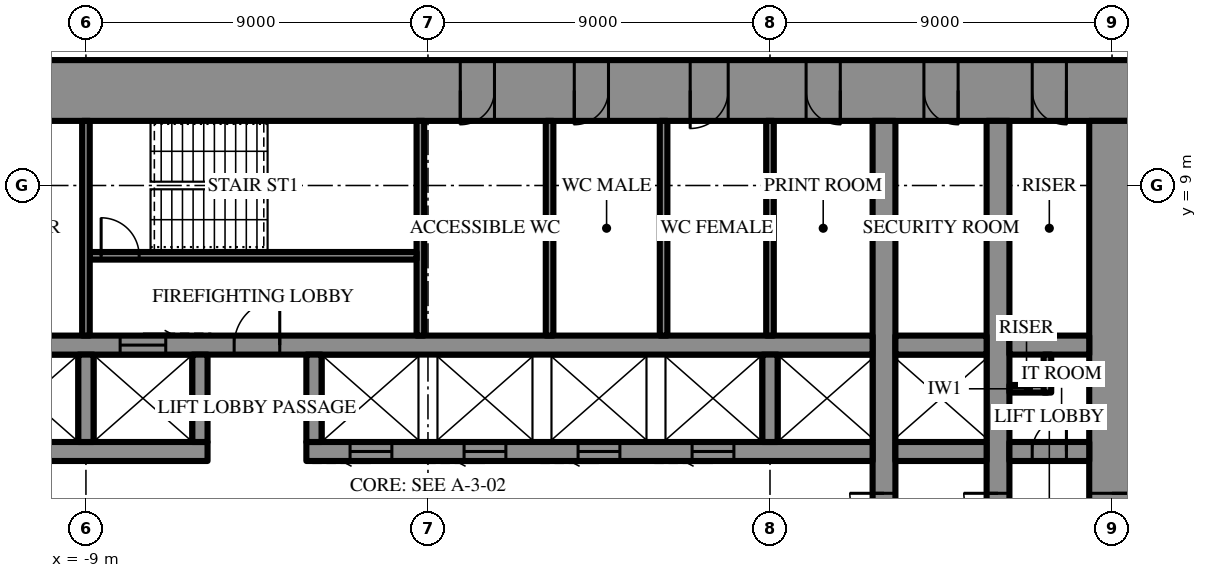
"""IFC4 building model, lengths in metres.
Left out: names, types, materials, properties, quantities, classifications, styles, units other than length and angle.
Written with IfcOpenShell. Run it as: python <this file> out.ifc"""

import sys

from ifc_helpers import new_model, si_unit, direction, frame, frame_2d, origin, place, context, subcontext, project, spatial, rectangle, extrude, element, fill, save


model = new_model("IFC4")
c1 = context("Model", 3, precision=1e-05, world=origin(), true_north=direction((0.0, 1.0)))
c2 = subcontext(c1, "Body", "Model", "MODEL_VIEW")
j1 = project(units=[si_unit("LENGTHUNIT", "METRE"), si_unit("PLANEANGLEUNIT", "RADIAN")], contexts=[c1])
p1 = place(None, origin())
s1 = spatial("IfcSite", under=j1, at=p1, CompositionType="ELEMENT")
p2 = place(p1, origin())
s2 = spatial("IfcBuilding", under=s1, at=p2, CompositionType="ELEMENT")
p3 = place(p2, frame((0.0, 0.0, 132.1)))
s3 = spatial("IfcBuildingStorey", under=s2, at=p3, CompositionType="ELEMENT", Elevation=132.1)
p4 = place(p3, frame((-18.6, 11.5, 0.0), z_axis=(0.0, 0.0, 1.0), x_axis=(1.0, 0.0, 0.0)))
e1 = element("IfcWall", 1, at=p4, inside=s3, PredefinedType="SHEAR", context=c2, shape_type="SweptSolid", body=[
    extrude(rectangle(XDim=37.2, YDim=1.6, at=frame_2d((18.6, 0.0))), origin(), (0.0, 0.0, 1.0), 4.2),
])
p5 = place(p4, frame((19.45, 0.0, 0.0)))
e2 = element("IfcOpeningElement", 2, at=p5, cuts=e1, PredefinedType="OPENING", context=c2, shape_type="SweptSolid", body=[
    extrude(rectangle(XDim=0.9, YDim=2.2, at=frame_2d((0.45, 1.1))), frame((0.0, 0.81, 0.0), z_axis=(0.0, -1.0, 0.0), x_axis=(1.0, 0.0, 0.0)), (0.0, 0.0, 1.0), 1.62),
])
p6 = place(p4, frame((22.45, 0.0, 0.0)))
e3 = element("IfcOpeningElement", 3, at=p6, cuts=e1, PredefinedType="OPENING", context=c2, shape_type="SweptSolid", body=[
    extrude(rectangle(XDim=0.9, YDim=2.2, at=frame_2d((0.45, 1.1))), frame((0.0, 0.81, 0.0), z_axis=(0.0, -1.0, 0.0), x_axis=(1.0, 0.0, 0.0)), (0.0, 0.0, 1.0), 1.62),
])
p7 = place(p4, frame((25.5, 0.0, 0.0)))
e4 = element("IfcOpeningElement", 4, at=p7, cuts=e1, PredefinedType="OPENING", context=c2, shape_type="SweptSolid", body=[
    extrude(rectangle(XDim=1.0, YDim=2.2, at=frame_2d((0.5, 1.1))), frame((0.0, 0.81, 0.0), z_axis=(0.0, -1.0, 0.0), x_axis=(1.0, 0.0, 0.0)), (0.0, 0.0, 1.0), 1.62),
])
p8 = place(p4, frame((1.8, 0.0, 0.0)))
e5 = element("IfcOpeningElement", 5, at=p8, cuts=e1, PredefinedType="OPENING", context=c2, shape_type="SweptSolid", body=[
    extrude(rectangle(XDim=0.9, YDim=2.2, at=frame_2d((0.45, 1.1))), frame((0.0, 0.81, 0.0), z_axis=(0.0, -1.0, 0.0), x_axis=(1.0, 0.0, 0.0)), (0.0, 0.0, 1.0), 1.62),
])
p9 = place(p4, frame((4.65, 0.0, 0.0)))
e6 = element("IfcOpeningElement", 6, at=p9, cuts=e1, PredefinedType="OPENING", context=c2, shape_type="SweptSolid", body=[
    extrude(rectangle(XDim=0.9, YDim=2.2, at=frame_2d((0.45, 1.1))), frame((0.0, 0.81, 0.0), z_axis=(0.0, -1.0, 0.0), x_axis=(1.0, 0.0, 0.0)), (0.0, 0.0, 1.0), 1.62),
])
p10 = place(p4, frame((7.75, 0.0, 0.0)))
e7 = element("IfcOpeningElement", 7, at=p10, cuts=e1, PredefinedType="OPENING", context=c2, shape_type="SweptSolid", body=[
    extrude(rectangle(XDim=0.9, YDim=2.2, at=frame_2d((0.45, 1.1))), frame((0.0, 0.81, 0.0), z_axis=(0.0, -1.0, 0.0), x_axis=(1.0, 0.0, 0.0)), (0.0, 0.0, 1.0), 1.62),
])
p11 = place(p4, frame((28.55, 0.0, 0.0)))
e8 = element("IfcOpeningElement", 8, at=p11, cuts=e1, PredefinedType="OPENING", context=c2, shape_type="SweptSolid", body=[
    extrude(rectangle(XDim=0.9, YDim=2.2, at=frame_2d((0.45, 1.1))), frame((0.0, 0.81, 0.0), z_axis=(0.0, -1.0, 0.0), x_axis=(1.0, 0.0, 0.0)), (0.0, 0.0, 1.0), 1.62),
])
p12 = place(p4, frame((31.65, 0.0, 0.0)))
e9 = element("IfcOpeningElement", 9, at=p12, cuts=e1, PredefinedType="OPENING", context=c2, shape_type="SweptSolid", body=[
    extrude(rectangle(XDim=0.9, YDim=2.2, at=frame_2d((0.45, 1.1))), frame((0.0, 0.81, 0.0), z_axis=(0.0, -1.0, 0.0), x_axis=(1.0, 0.0, 0.0)), (0.0, 0.0, 1.0), 1.62),
])
p13 = place(p4, frame((34.5, 0.0, 0.0)))
e10 = element("IfcOpeningElement", 10, at=p13, cuts=e1, PredefinedType="OPENING", context=c2, shape_type="SweptSolid", body=[
    extrude(rectangle(XDim=0.9, YDim=2.2, at=frame_2d((0.45, 1.1))), frame((0.0, 0.81, 0.0), z_axis=(0.0, -1.0, 0.0), x_axis=(1.0, 0.0, 0.0)), (0.0, 0.0, 1.0), 1.62),
])
p14 = place(p3, frame((18.0, -10.7, 0.0), z_axis=(0.0, 0.0, 1.0), x_axis=(0.0, 1.0, 0.0)))
e11 = element("IfcWall", 11, at=p14, inside=s3, PredefinedType="SHEAR", context=c2, shape_type="SweptSolid", body=[
    extrude(rectangle(XDim=21.4, YDim=1.2, at=frame_2d((10.7, 0.0))), origin(), (0.0, 0.0, 1.0), 4.2),
])
p15 = place(p14, frame((9.8, 0.0, 0.0)))
e12 = element("IfcOpeningElement", 12, at=p15, cuts=e11, PredefinedType="OPENING", context=c2, shape_type="SweptSolid", body=[
    extrude(rectangle(XDim=1.8, YDim=2.4, at=frame_2d((0.9, 1.2))), frame((0.0, 0.61, 0.0), z_axis=(0.0, -1.0, 0.0), x_axis=(1.0, 0.0, 0.0)), (0.0, 0.0, 1.0), 1.22),
])
p16 = place(p3, frame((12.0, -10.7, 0.0), z_axis=(0.0, 0.0, 1.0), x_axis=(0.0, 1.0, 0.0)))
e13 = element("IfcWall", 13, at=p16, inside=s3, PredefinedType="SHEAR", context=c2, shape_type="SweptSolid", body=[
    extrude(rectangle(XDim=21.4, YDim=0.6, at=frame_2d((10.7, 0.0))), origin(), (0.0, 0.0, 1.0), 4.2),
])
p17 = place(p16, frame((9.8, 0.0, 0.0)))
e14 = element("IfcOpeningElement", 14, at=p17, cuts=e13, PredefinedType="OPENING", context=c2, shape_type="SweptSolid", body=[
    extrude(rectangle(XDim=1.8, YDim=2.4, at=frame_2d((0.9, 1.2))), frame((0.0, 0.31, 0.0), z_axis=(0.0, -1.0, 0.0), x_axis=(1.0, 0.0, 0.0)), (0.0, 0.0, 1.0), 0.62),
])
p18 = place(p3, frame((15.0, -10.7, 0.0), z_axis=(0.0, 0.0, 1.0), x_axis=(0.0, 1.0, 0.0)))
e15 = element("IfcWall", 15, at=p18, inside=s3, PredefinedType="SHEAR", context=c2, shape_type="SweptSolid", body=[
    extrude(rectangle(XDim=21.4, YDim=0.6, at=frame_2d((10.7, 0.0))), origin(), (0.0, 0.0, 1.0), 4.2),
])
p19 = place(p18, frame((9.8, 0.0, 0.0)))
e16 = element("IfcOpeningElement", 16, at=p19, cuts=e15, PredefinedType="OPENING", context=c2, shape_type="SweptSolid", body=[
    extrude(rectangle(XDim=1.8, YDim=2.4, at=frame_2d((0.9, 1.2))), frame((0.0, 0.31, 0.0), z_axis=(0.0, -1.0, 0.0), x_axis=(1.0, 0.0, 0.0)), (0.0, 0.0, 1.0), 0.62),
])
p20 = place(p3, frame((-11.7, 2.0, 0.0), z_axis=(0.0, 0.0, 1.0), x_axis=(1.0, 0.0, 0.0)))
e17 = element("IfcWall", 17, at=p20, inside=s3, PredefinedType="SHEAR", context=c2, shape_type="SweptSolid", body=[
    extrude(rectangle(XDim=5.9, YDim=0.5, at=frame_2d((2.95, 0.0))), origin(), (0.0, 0.0, 1.0), 4.2),
])
p21 = place(p3, frame((-3.2, 2.0, 0.0), z_axis=(0.0, 0.0, 1.0), x_axis=(1.0, 0.0, 0.0)))
e18 = element("IfcWall", 18, at=p21, inside=s3, PredefinedType="SHEAR", context=c2, shape_type="SweptSolid", body=[
    extrude(rectangle(XDim=14.9, YDim=0.5, at=frame_2d((7.45, 0.0))), origin(), (0.0, 0.0, 1.0), 4.2),
])
p22 = place(p21, frame((1.15, 0.0, 0.0)))
e19 = element("IfcOpeningElement", 19, at=p22, cuts=e18, PredefinedType="OPENING", context=c2, shape_type="SweptSolid", body=[
    extrude(rectangle(XDim=1.1, YDim=2.2, at=frame_2d((0.55, 1.1))), frame((0.0, 0.26, 0.0), z_axis=(0.0, -1.0, 0.0), x_axis=(1.0, 0.0, 0.0)), (0.0, 0.0, 1.0), 0.52),
])
p23 = place(p21, frame((4.15, 0.0, 0.0)))
e20 = element("IfcOpeningElement", 20, at=p23, cuts=e18, PredefinedType="OPENING", context=c2, shape_type="SweptSolid", body=[
    extrude(rectangle(XDim=1.1, YDim=2.2, at=frame_2d((0.55, 1.1))), frame((0.0, 0.26, 0.0), z_axis=(0.0, -1.0, 0.0), x_axis=(1.0, 0.0, 0.0)), (0.0, 0.0, 1.0), 0.52),
])
p24 = place(p21, frame((7.15, 0.0, 0.0)))
e21 = element("IfcOpeningElement", 21, at=p24, cuts=e18, PredefinedType="OPENING", context=c2, shape_type="SweptSolid", body=[
    extrude(rectangle(XDim=1.1, YDim=2.2, at=frame_2d((0.55, 1.1))), frame((0.0, 0.26, 0.0), z_axis=(0.0, -1.0, 0.0), x_axis=(1.0, 0.0, 0.0)), (0.0, 0.0, 1.0), 0.52),
])
p25 = place(p21, frame((10.15, 0.0, 0.0)))
e22 = element("IfcOpeningElement", 22, at=p25, cuts=e18, PredefinedType="OPENING", context=c2, shape_type="SweptSolid", body=[
    extrude(rectangle(XDim=1.1, YDim=2.2, at=frame_2d((0.55, 1.1))), frame((0.0, 0.26, 0.0), z_axis=(0.0, -1.0, 0.0), x_axis=(1.0, 0.0, 0.0)), (0.0, 0.0, 1.0), 0.52),
])
p26 = place(p3, frame((12.3, 2.0, 0.0), z_axis=(0.0, 0.0, 1.0), x_axis=(1.0, 0.0, 0.0)))
e23 = element("IfcWall", 23, at=p26, inside=s3, PredefinedType="SHEAR", context=c2, shape_type="SweptSolid", body=[
    extrude(rectangle(XDim=2.4, YDim=0.5, at=frame_2d((1.2, 0.0))), origin(), (0.0, 0.0, 1.0), 4.2),
])
p27 = place(p3, frame((15.3, 2.0, 0.0), z_axis=(0.0, 0.0, 1.0), x_axis=(1.0, 0.0, 0.0)))
e24 = element("IfcWall", 24, at=p27, inside=s3, PredefinedType="SHEAR", context=c2, shape_type="SweptSolid", body=[
    extrude(rectangle(XDim=2.1, YDim=0.5, at=frame_2d((1.05, 0.0))), origin(), (0.0, 0.0, 1.0), 4.2),
])
p28 = place(p27, frame((0.6, 0.0, 0.0)))
e25 = element("IfcOpeningElement", 25, at=p28, cuts=e24, PredefinedType="OPENING", context=c2, shape_type="SweptSolid", body=[
    extrude(rectangle(XDim=0.9, YDim=2.2, at=frame_2d((0.45, 1.1))), frame((0.0, 0.26, 0.0), z_axis=(0.0, -1.0, 0.0), x_axis=(1.0, 0.0, 0.0)), (0.0, 0.0, 1.0), 0.52),
])
p29 = place(p3, frame((-11.7, 4.8, 0.0), z_axis=(0.0, 0.0, 1.0), x_axis=(1.0, 0.0, 0.0)))
e26 = element("IfcWall", 26, at=p29, inside=s3, PredefinedType="SHEAR", context=c2, shape_type="SweptSolid", body=[
    extrude(rectangle(XDim=23.4, YDim=0.5, at=frame_2d((11.7, 0.0))), origin(), (0.0, 0.0, 1.0), 4.2),
])
p30 = place(p29, frame((6.6, 0.0, 0.0)))
e27 = element("IfcOpeningElement", 27, at=p30, cuts=e26, PredefinedType="OPENING", context=c2, shape_type="SweptSolid", body=[
    extrude(rectangle(XDim=1.2, YDim=2.2, at=frame_2d((0.6, 1.1))), frame((0.0, 0.26, 0.0), z_axis=(0.0, -1.0, 0.0), x_axis=(1.0, 0.0, 0.0)), (0.0, 0.0, 1.0), 0.52),
])
p31 = place(p29, frame((3.6, 0.0, 0.0)))
e28 = element("IfcOpeningElement", 28, at=p31, cuts=e26, PredefinedType="OPENING", context=c2, shape_type="SweptSolid", body=[
    extrude(rectangle(XDim=1.2, YDim=2.2, at=frame_2d((0.6, 1.1))), frame((0.0, 0.26, 0.0), z_axis=(0.0, -1.0, 0.0), x_axis=(1.0, 0.0, 0.0)), (0.0, 0.0, 1.0), 0.52),
])
p32 = place(p3, frame((12.3, 4.8, 0.0), z_axis=(0.0, 0.0, 1.0), x_axis=(1.0, 0.0, 0.0)))
e29 = element("IfcWall", 29, at=p32, inside=s3, PredefinedType="SHEAR", context=c2, shape_type="SweptSolid", body=[
    extrude(rectangle(XDim=2.4, YDim=0.5, at=frame_2d((1.2, 0.0))), origin(), (0.0, 0.0, 1.0), 4.2),
])
p33 = place(p3, frame((15.3, 4.8, 0.0), z_axis=(0.0, 0.0, 1.0), x_axis=(1.0, 0.0, 0.0)))
e30 = element("IfcWall", 30, at=p33, inside=s3, PredefinedType="SHEAR", context=c2, shape_type="SweptSolid", body=[
    extrude(rectangle(XDim=2.1, YDim=0.5, at=frame_2d((1.05, 0.0))), origin(), (0.0, 0.0, 1.0), 4.2),
])
for number, where, z_axis, x_axis in (
    (31, (-9.0, 2.25, 0.0), (0.0, 0.0, 1.0), (0.0, 1.0, 0.0)),
    (32, (-6.0, 2.25, 0.0), (0.0, 0.0, 1.0), (0.0, 1.0, 0.0)),
    (33, (-3.0, 2.25, 0.0), (0.0, 0.0, 1.0), (0.0, 1.0, 0.0)),
    (34, (9.0, 2.25, 0.0), (0.0, 0.0, 1.0), (0.0, 1.0, 0.0)),
):
    element("IfcWall", number, at=place(p3, frame(where, z_axis=z_axis, x_axis=x_axis)), inside=s3, PredefinedType="SHEAR", context=c2, shape_type="SweptSolid", body=[
        extrude(rectangle(XDim=2.3, YDim=0.4, at=frame_2d((1.15, 0.0))), origin(), (0.0, 0.0, 1.0), 4.2),
    ])
p34 = place(p3, frame((-0.2, 5.05, 0.0), z_axis=(0.0, 0.0, 1.0), x_axis=(0.0, 1.0, 0.0)))
e35 = element("IfcWall", 35, at=p34, inside=s3, PredefinedType="SHEAR", context=c2, shape_type="SweptSolid", body=[
    extrude(rectangle(XDim=5.65, YDim=0.2, at=frame_2d((2.825, 0.0))), origin(), (0.0, 0.0, 1.0), 4.2),
])
p35 = place(p3, frame((-8.9, 7.15, 0.0), z_axis=(0.0, 0.0, 1.0), x_axis=(1.0, 0.0, 0.0)))
e36 = element("IfcWall", 36, at=p35, inside=s3, PredefinedType="SHEAR", context=c2, shape_type="SweptSolid", body=[
    extrude(rectangle(XDim=8.6, YDim=0.2, at=frame_2d((4.3, 0.0))), origin(), (0.0, 0.0, 1.0), 4.2),
])
p36 = place(p35, frame((0.3, 0.0, 0.0)))
e37 = element("IfcOpeningElement", 37, at=p36, cuts=e36, PredefinedType="OPENING", context=c2, shape_type="SweptSolid", body=[
    extrude(rectangle(XDim=1.0, YDim=2.2, at=frame_2d((0.5, 1.1))), frame((0.0, 0.11, 0.0), z_axis=(0.0, -1.0, 0.0), x_axis=(1.0, 0.0, 0.0)), (0.0, 0.0, 1.0), 0.22),
])
for number, where, z_axis, x_axis in (
    (38, (-9.0, 5.05, 0.0), (0.0, 0.0, 1.0), (0.0, 1.0, 0.0)),
    (39, (9.0, 5.05, 0.0), (0.0, 0.0, 1.0), (0.0, 1.0, 0.0)),
    (40, (3.2, 5.05, 0.0), (0.0, 0.0, 1.0), (0.0, 1.0, 0.0)),
    (41, (6.2, 5.05, 0.0), (0.0, 0.0, 1.0), (0.0, 1.0, 0.0)),
):
    element("IfcWall", number, at=place(p3, frame(where, z_axis=z_axis, x_axis=x_axis)), inside=s3, PredefinedType="PARTITIONING", context=c2, shape_type="SweptSolid", body=[
        extrude(rectangle(XDim=5.65, YDim=0.2, at=frame_2d((2.825, 0.0))), origin(), (0.0, 0.0, 1.0), 4.0),
    ])
for number, where, z_axis, x_axis in (
    (42, (15.3, 3.65, 0.0), (0.0, 0.0, 1.0), (1.0, 0.0, 0.0)),
    (43, (16.3, 3.55, 0.0), (0.0, 0.0, 1.0), (0.0, 1.0, 0.0)),
):
    element("IfcWall", number, at=place(p3, frame(where, z_axis=z_axis, x_axis=x_axis)), inside=s3, PredefinedType="PARTITIONING", context=c2, shape_type="SweptSolid", body=[
        extrude(rectangle(XDim=1.0, YDim=0.2, at=frame_2d((0.5, 0.0))), origin(), (0.0, 0.0, 1.0), 4.0),
    ])
p37 = place(p15, frame((1.8, 0.0, 0.0), z_axis=(0.0, 0.0, 1.0), x_axis=(-1.0, 0.0, 0.0)))
e44 = element("IfcDoor", 44, at=p37, inside=s3, OperationType="DOUBLE_DOOR_SINGLE_SWING", PredefinedType="DOOR", context=c2, shape_type="SweptSolid", body=[
    extrude(rectangle(XDim=1.8, YDim=2.4, at=frame_2d((0.9, 1.2))), frame((0.0, 0.025, 0.0), z_axis=(0.0, -1.0, 0.0), x_axis=(1.0, 0.0, 0.0)), (0.0, 0.0, 1.0), 0.05),
])
fill(e12, e44)
p38 = place(p30, origin())
e45 = element("IfcDoor", 45, at=p38, inside=s3, OperationType="SINGLE_SWING_LEFT", PredefinedType="DOOR", context=c2, shape_type="SweptSolid", body=[
    extrude(rectangle(XDim=1.2, YDim=2.2, at=frame_2d((0.6, 1.1))), frame((0.0, 0.025, 0.0), z_axis=(0.0, -1.0, 0.0), x_axis=(1.0, 0.0, 0.0)), (0.0, 0.0, 1.0), 0.05),
])
fill(e27, e45)
p39 = place(p36, origin())
e46 = element("IfcDoor", 46, at=p39, inside=s3, OperationType="SINGLE_SWING_RIGHT", PredefinedType="DOOR", context=c2, shape_type="SweptSolid", body=[
    extrude(rectangle(XDim=1.0, YDim=2.2, at=frame_2d((0.5, 1.1))), frame((0.0, 0.025, 0.0), z_axis=(0.0, -1.0, 0.0), x_axis=(1.0, 0.0, 0.0)), (0.0, 0.0, 1.0), 0.05),
])
fill(e37, e46)
p40 = place(p5, frame((0.9, 0.0, 0.0), z_axis=(0.0, 0.0, 1.0), x_axis=(-1.0, 0.0, 0.0)))
e47 = element("IfcDoor", 47, at=p40, inside=s3, OperationType="SINGLE_SWING_LEFT", PredefinedType="DOOR", context=c2, shape_type="SweptSolid", body=[
    extrude(rectangle(XDim=0.9, YDim=2.2, at=frame_2d((0.45, 1.1))), frame((0.0, 0.025, 0.0), z_axis=(0.0, -1.0, 0.0), x_axis=(1.0, 0.0, 0.0)), (0.0, 0.0, 1.0), 0.05),
])
fill(e2, e47)
p41 = place(p6, frame((0.9, 0.0, 0.0), z_axis=(0.0, 0.0, 1.0), x_axis=(-1.0, 0.0, 0.0)))
e48 = element("IfcDoor", 48, at=p41, inside=s3, OperationType="SINGLE_SWING_LEFT", PredefinedType="DOOR", context=c2, shape_type="SweptSolid", body=[
    extrude(rectangle(XDim=0.9, YDim=2.2, at=frame_2d((0.45, 1.1))), frame((0.0, 0.025, 0.0), z_axis=(0.0, -1.0, 0.0), x_axis=(1.0, 0.0, 0.0)), (0.0, 0.0, 1.0), 0.05),
])
fill(e3, e48)
p42 = place(p7, frame((1.0, 0.0, 0.0), z_axis=(0.0, 0.0, 1.0), x_axis=(-1.0, 0.0, 0.0)))
e49 = element("IfcDoor", 49, at=p42, inside=s3, OperationType="SINGLE_SWING_LEFT", PredefinedType="DOOR", context=c2, shape_type="SweptSolid", body=[
    extrude(rectangle(XDim=1.0, YDim=2.2, at=frame_2d((0.5, 1.1))), frame((0.0, 0.025, 0.0), z_axis=(0.0, -1.0, 0.0), x_axis=(1.0, 0.0, 0.0)), (0.0, 0.0, 1.0), 0.05),
])
fill(e4, e49)
p43 = place(p11, frame((0.9, 0.0, 0.0), z_axis=(0.0, 0.0, 1.0), x_axis=(-1.0, 0.0, 0.0)))
e50 = element("IfcDoor", 50, at=p43, inside=s3, OperationType="SINGLE_SWING_RIGHT", PredefinedType="DOOR", context=c2, shape_type="SweptSolid", body=[
    extrude(rectangle(XDim=0.9, YDim=2.2, at=frame_2d((0.45, 1.1))), frame((0.0, 0.025, 0.0), z_axis=(0.0, -1.0, 0.0), x_axis=(1.0, 0.0, 0.0)), (0.0, 0.0, 1.0), 0.05),
])
fill(e8, e50)
p44 = place(p12, frame((0.9, 0.0, 0.0), z_axis=(0.0, 0.0, 1.0), x_axis=(-1.0, 0.0, 0.0)))
e51 = element("IfcDoor", 51, at=p44, inside=s3, OperationType="SINGLE_SWING_RIGHT", PredefinedType="DOOR", context=c2, shape_type="SweptSolid", body=[
    extrude(rectangle(XDim=0.9, YDim=2.2, at=frame_2d((0.45, 1.1))), frame((0.0, 0.025, 0.0), z_axis=(0.0, -1.0, 0.0), x_axis=(1.0, 0.0, 0.0)), (0.0, 0.0, 1.0), 0.05),
])
fill(e9, e51)
p45 = place(p13, frame((0.9, 0.0, 0.0), z_axis=(0.0, 0.0, 1.0), x_axis=(-1.0, 0.0, 0.0)))
e52 = element("IfcDoor", 52, at=p45, inside=s3, OperationType="SINGLE_SWING_RIGHT", PredefinedType="DOOR", context=c2, shape_type="SweptSolid", body=[
    extrude(rectangle(XDim=0.9, YDim=2.2, at=frame_2d((0.45, 1.1))), frame((0.0, 0.025, 0.0), z_axis=(0.0, -1.0, 0.0), x_axis=(1.0, 0.0, 0.0)), (0.0, 0.0, 1.0), 0.05),
])
fill(e10, e52)
p46 = place(p28, origin())
e53 = element("IfcDoor", 53, at=p46, inside=s3, OperationType="SINGLE_SWING_LEFT", PredefinedType="DOOR", context=c2, shape_type="SweptSolid", body=[
    extrude(rectangle(XDim=0.9, YDim=2.2, at=frame_2d((0.45, 1.1))), frame((0.0, 0.025, 0.0), z_axis=(0.0, -1.0, 0.0), x_axis=(1.0, 0.0, 0.0)), (0.0, 0.0, 1.0), 0.05),
])
fill(e25, e53)
p47 = place(p17, origin())
e54 = element("IfcDoor", 54, at=p47, inside=s3, OperationType="DOUBLE_DOOR_SINGLE_SWING", PredefinedType="DOOR", context=c2, shape_type="SweptSolid", body=[
    extrude(rectangle(XDim=1.8, YDim=2.4, at=frame_2d((0.9, 1.2))), frame((0.0, 0.025, 0.0), z_axis=(0.0, -1.0, 0.0), x_axis=(1.0, 0.0, 0.0)), (0.0, 0.0, 1.0), 0.05),
])
fill(e14, e54)
p48 = place(p19, origin())
e55 = element("IfcDoor", 55, at=p48, inside=s3, OperationType="DOUBLE_DOOR_SINGLE_SWING", PredefinedType="DOOR", context=c2, shape_type="SweptSolid", body=[
    extrude(rectangle(XDim=1.8, YDim=2.4, at=frame_2d((0.9, 1.2))), frame((0.0, 0.025, 0.0), z_axis=(0.0, -1.0, 0.0), x_axis=(1.0, 0.0, 0.0)), (0.0, 0.0, 1.0), 0.05),
])
fill(e16, e55)
p49 = place(p31, origin())
e56 = element("IfcDoor", 56, at=p49, inside=s3, OperationType="SLIDING_TO_LEFT", PredefinedType="DOOR", context=c2, shape_type="SweptSolid", body=[
    extrude(rectangle(XDim=1.2, YDim=2.2, at=frame_2d((0.6, 1.1))), frame((0.0, 0.025, 0.0), z_axis=(0.0, -1.0, 0.0), x_axis=(1.0, 0.0, 0.0)), (0.0, 0.0, 1.0), 0.05),
])
fill(e28, e56)
p50 = place(p22, frame((1.1, 0.0, 0.0), z_axis=(0.0, 0.0, 1.0), x_axis=(-1.0, 0.0, 0.0)))
e57 = element("IfcDoor", 57, at=p50, inside=s3, OperationType="SLIDING_TO_LEFT", PredefinedType="DOOR", context=c2, shape_type="SweptSolid", body=[
    extrude(rectangle(XDim=1.1, YDim=2.2, at=frame_2d((0.55, 1.1))), frame((0.0, 0.025, 0.0), z_axis=(0.0, -1.0, 0.0), x_axis=(1.0, 0.0, 0.0)), (0.0, 0.0, 1.0), 0.05),
])
fill(e19, e57)
p51 = place(p23, frame((1.1, 0.0, 0.0), z_axis=(0.0, 0.0, 1.0), x_axis=(-1.0, 0.0, 0.0)))
e58 = element("IfcDoor", 58, at=p51, inside=s3, OperationType="SLIDING_TO_LEFT", PredefinedType="DOOR", context=c2, shape_type="SweptSolid", body=[
    extrude(rectangle(XDim=1.1, YDim=2.2, at=frame_2d((0.55, 1.1))), frame((0.0, 0.025, 0.0), z_axis=(0.0, -1.0, 0.0), x_axis=(1.0, 0.0, 0.0)), (0.0, 0.0, 1.0), 0.05),
])
fill(e20, e58)
p52 = place(p24, frame((1.1, 0.0, 0.0), z_axis=(0.0, 0.0, 1.0), x_axis=(-1.0, 0.0, 0.0)))
e59 = element("IfcDoor", 59, at=p52, inside=s3, OperationType="SLIDING_TO_LEFT", PredefinedType="DOOR", context=c2, shape_type="SweptSolid", body=[
    extrude(rectangle(XDim=1.1, YDim=2.2, at=frame_2d((0.55, 1.1))), frame((0.0, 0.025, 0.0), z_axis=(0.0, -1.0, 0.0), x_axis=(1.0, 0.0, 0.0)), (0.0, 0.0, 1.0), 0.05),
])
fill(e21, e59)
p53 = place(p25, frame((1.1, 0.0, 0.0), z_axis=(0.0, 0.0, 1.0), x_axis=(-1.0, 0.0, 0.0)))
e60 = element("IfcDoor", 60, at=p53, inside=s3, OperationType="SLIDING_TO_LEFT", PredefinedType="DOOR", context=c2, shape_type="SweptSolid", body=[
    extrude(rectangle(XDim=1.1, YDim=2.2, at=frame_2d((0.55, 1.1))), frame((0.0, 0.025, 0.0), z_axis=(0.0, -1.0, 0.0), x_axis=(1.0, 0.0, 0.0)), (0.0, 0.0, 1.0), 0.05),
])
fill(e22, e60)
save(model, sys.argv[1])
